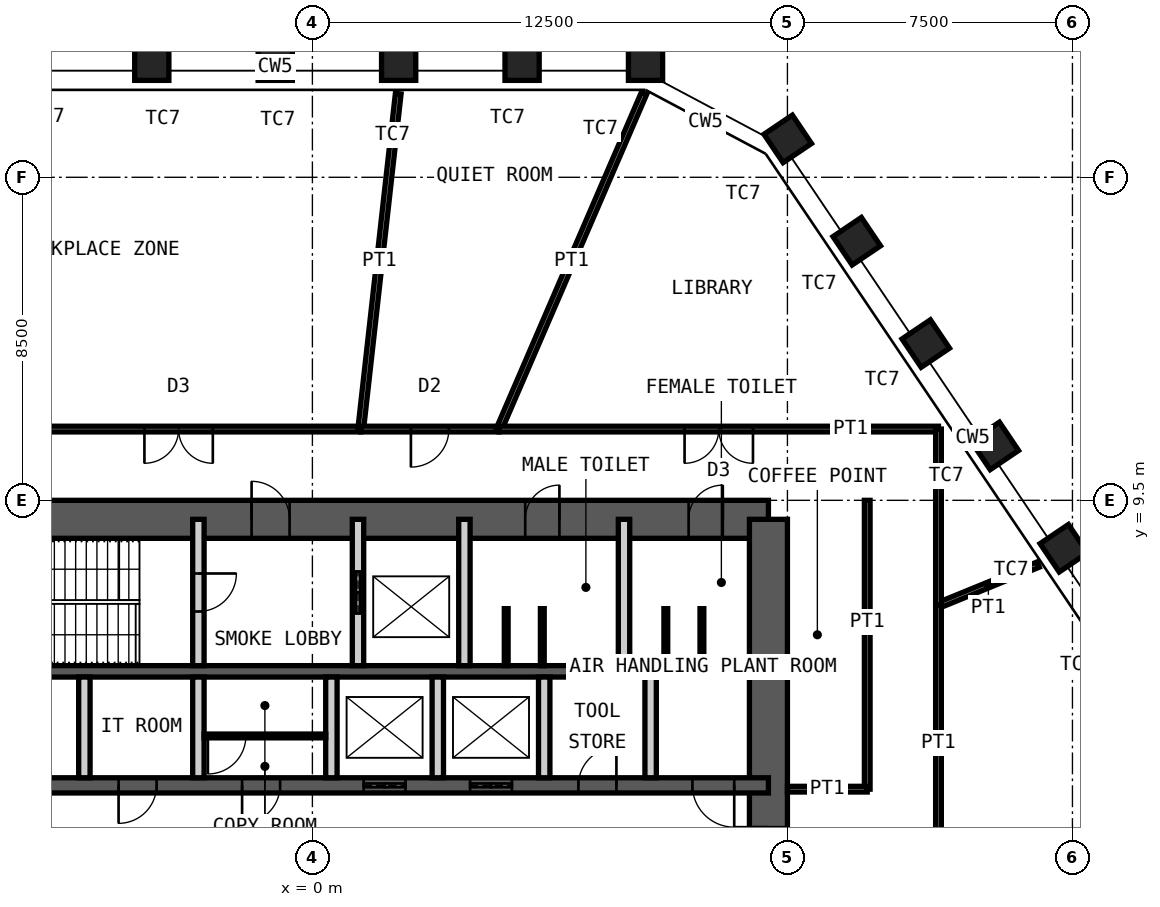
"""IFC4 building model, lengths in metres.
Left out: names, types, materials, properties, quantities, classifications, styles, units other than length and angle.
Written with IfcOpenShell. Run it as: python <this file> out.ifc"""

import sys

from ifc_helpers import new_model, si_unit, direction, frame, frame_2d, origin, origin_2d, place, context, subcontext, project, spatial, rectangle, hollow_rectangle, extrude, element, fill, save


model = new_model("IFC4")
c1 = context("Model", 3, precision=1e-05, world=origin(), true_north=direction((0.0, 1.0)))
c2 = subcontext(c1, "Body", "Model", "MODEL_VIEW")
j1 = project(units=[si_unit("LENGTHUNIT", "METRE"), si_unit("PLANEANGLEUNIT", "RADIAN")], contexts=[c1])
p1 = place(None, origin())
s1 = spatial("IfcSite", under=j1, at=p1, CompositionType="ELEMENT")
p2 = place(p1, origin())
s2 = spatial("IfcBuilding", under=s1, at=p2, CompositionType="ELEMENT")
p3 = place(p2, frame((0.0, 0.0, 287.2)))
s3 = spatial("IfcBuildingStorey", under=s2, at=p3, CompositionType="ELEMENT", Elevation=287.2)
for number, where, z_axis, x_axis in (
    (1, (-4.226, 21.0, 0.0), (0.0, 0.0, 1.0), (-1.0, 0.0, 0.0)),
    (2, (-0.978, 21.0, 0.0), (0.0, 0.0, 1.0), (-1.0, 0.0, 0.0)),
    (3, (2.27, 21.0, 0.0), (0.0, 0.0, 1.0), (-1.0, 0.0, 0.0)),
    (4, (5.518, 21.0, 0.0), (0.0, 0.0, 1.0), (-1.0, 0.0, 0.0)),
    (5, (8.766, 21.0, 0.0), (0.0, 0.0, 1.0), (-1.0, 0.0, 0.0)),
    (6, (12.508, 19.01, 0.0), (0.0, 0.0, 1.0), (-0.559, 0.829, 0.0)),
    (7, (14.324, 16.318, 0.0), (0.0, 0.0, 1.0), (-0.559, 0.829, 0.0)),
    (8, (16.141, 13.625, 0.0), (0.0, 0.0, 1.0), (-0.559, 0.829, 0.0)),
    (9, (17.957, 10.932, 0.0), (0.0, 0.0, 1.0), (-0.559, 0.829, 0.0)),
    (10, (19.773, 8.239, 0.0), (0.0, 0.0, 1.0), (-0.559, 0.829, 0.0)),
):
    element("IfcColumn", number, at=place(p3, frame(where, z_axis=z_axis, x_axis=x_axis)), inside=s3, PredefinedType="COLUMN", context=c2, shape_type="SweptSolid", body=[
        extrude(hollow_rectangle(XDim=0.9, YDim=0.9, WallThickness=0.06, at=origin_2d()), origin(), (0.0, 0.0, 1.0), 4.2),
    ])
p4 = place(p3, frame((-12.0, 9.0, 0.0), z_axis=(0.0, 0.0, 1.0), x_axis=(1.0, 0.0, 0.0)))
e11 = element("IfcWall", 11, at=p4, inside=s3, PredefinedType="SHEAR", context=c2, shape_type="SweptSolid", body=[
    extrude(rectangle(XDim=24.0, YDim=1.0, at=frame_2d((12.0, 0.0))), origin(), (0.0, 0.0, 1.0), 4.2),
])
p5 = place(p4, frame((10.4, 0.0, 0.0)))
e12 = element("IfcOpeningElement", 12, at=p5, cuts=e11, PredefinedType="OPENING", context=c2, shape_type="SweptSolid", body=[
    extrude(rectangle(XDim=1.0, YDim=2.1, at=frame_2d((0.5, 1.05))), frame((0.0, 0.51, 0.0), z_axis=(0.0, -1.0, 0.0), x_axis=(1.0, 0.0, 0.0)), (0.0, 0.0, 1.0), 1.02),
])
p6 = place(p4, frame((17.6, 0.0, 0.0)))
e13 = element("IfcOpeningElement", 13, at=p6, cuts=e11, PredefinedType="OPENING", context=c2, shape_type="SweptSolid", body=[
    extrude(rectangle(XDim=0.9, YDim=2.1, at=frame_2d((0.45, 1.05))), frame((0.0, 0.51, 0.0), z_axis=(0.0, -1.0, 0.0), x_axis=(1.0, 0.0, 0.0)), (0.0, 0.0, 1.0), 1.02),
])
p7 = place(p4, frame((21.9, 0.0, 0.0)))
e14 = element("IfcOpeningElement", 14, at=p7, cuts=e11, PredefinedType="OPENING", context=c2, shape_type="SweptSolid", body=[
    extrude(rectangle(XDim=0.9, YDim=2.1, at=frame_2d((0.45, 1.05))), frame((0.0, 0.51, 0.0), z_axis=(0.0, -1.0, 0.0), x_axis=(1.0, 0.0, 0.0)), (0.0, 0.0, 1.0), 1.02),
])
p8 = place(p3, frame((12.0, -9.0, 0.0), z_axis=(0.0, 0.0, 1.0), x_axis=(0.0, 1.0, 0.0)))
e15 = element("IfcWall", 15, at=p8, inside=s3, PredefinedType="SHEAR", context=c2, shape_type="SweptSolid", body=[
    extrude(rectangle(XDim=18.0, YDim=1.0, at=frame_2d((9.0, 0.0))), origin(), (0.0, 0.0, 1.0), 4.2),
])
p9 = place(p8, frame((8.1, 0.0, 0.0)))
e16 = element("IfcOpeningElement", 16, at=p9, cuts=e15, PredefinedType="OPENING", context=c2, shape_type="SweptSolid", body=[
    extrude(rectangle(XDim=1.8, YDim=2.1, at=frame_2d((0.9, 1.05))), frame((0.0, 0.51, 0.0), z_axis=(0.0, -1.0, 0.0), x_axis=(1.0, 0.0, 0.0)), (0.0, 0.0, 1.0), 1.02),
])
p10 = place(p3, frame((-12.0, 5.0, 0.0), z_axis=(0.0, 0.0, 1.0), x_axis=(1.0, 0.0, 0.0)))
e17 = element("IfcWall", 17, at=p10, inside=s3, PredefinedType="SHEAR", context=c2, shape_type="SweptSolid", body=[
    extrude(rectangle(XDim=24.0, YDim=0.3, at=frame_2d((12.0, 0.0))), origin(), (0.0, 0.0, 1.0), 4.2),
])
p11 = place(p3, frame((-12.0, 2.0, 0.0), z_axis=(0.0, 0.0, 1.0), x_axis=(1.0, 0.0, 0.0)))
e18 = element("IfcWall", 18, at=p11, inside=s3, PredefinedType="SHEAR", context=c2, shape_type="SweptSolid", body=[
    extrude(rectangle(XDim=24.0, YDim=0.4, at=frame_2d((12.0, 0.0))), origin(), (0.0, 0.0, 1.0), 4.2),
])
p12 = place(p11, frame((2.4, 0.0, 0.0)))
e19 = element("IfcOpeningElement", 19, at=p12, cuts=e18, PredefinedType="OPENING", context=c2, shape_type="SweptSolid", body=[
    extrude(rectangle(XDim=1.1, YDim=2.1, at=frame_2d((0.55, 1.05))), frame((0.0, 0.21, 0.0), z_axis=(0.0, -1.0, 0.0), x_axis=(1.0, 0.0, 0.0)), (0.0, 0.0, 1.0), 0.42),
])
p13 = place(p11, frame((22.0, 0.0, 0.0)))
e20 = element("IfcOpeningElement", 20, at=p13, cuts=e18, PredefinedType="OPENING", context=c2, shape_type="SweptSolid", body=[
    extrude(rectangle(XDim=1.1, YDim=2.1, at=frame_2d((0.55, 1.05))), frame((0.0, 0.21, 0.0), z_axis=(0.0, -1.0, 0.0), x_axis=(1.0, 0.0, 0.0)), (0.0, 0.0, 1.0), 0.42),
])
p14 = place(p11, frame((10.15, 0.0, 0.0)))
e21 = element("IfcOpeningElement", 21, at=p14, cuts=e18, PredefinedType="OPENING", context=c2, shape_type="SweptSolid", body=[
    extrude(rectangle(XDim=1.0, YDim=2.1, at=frame_2d((0.5, 1.05))), frame((0.0, 0.21, 0.0), z_axis=(0.0, -1.0, 0.0), x_axis=(1.0, 0.0, 0.0)), (0.0, 0.0, 1.0), 0.42),
])
p15 = place(p11, frame((6.9, 0.0, 0.0)))
e22 = element("IfcOpeningElement", 22, at=p15, cuts=e18, PredefinedType="OPENING", context=c2, shape_type="SweptSolid", body=[
    extrude(rectangle(XDim=1.0, YDim=2.1, at=frame_2d((0.5, 1.05))), frame((0.0, 0.21, 0.0), z_axis=(0.0, -1.0, 0.0), x_axis=(1.0, 0.0, 0.0)), (0.0, 0.0, 1.0), 0.42),
])
p16 = place(p11, frame((13.35, 0.0, 0.0)))
e23 = element("IfcOpeningElement", 23, at=p16, cuts=e18, PredefinedType="OPENING", context=c2, shape_type="SweptSolid", body=[
    extrude(rectangle(XDim=1.1, YDim=2.4, at=frame_2d((0.55, 1.2))), frame((0.0, 0.21, 0.0), z_axis=(0.0, -1.0, 0.0), x_axis=(1.0, 0.0, 0.0)), (0.0, 0.0, 1.0), 0.42),
])
p17 = place(p11, frame((16.15, 0.0, 0.0)))
e24 = element("IfcOpeningElement", 24, at=p17, cuts=e18, PredefinedType="OPENING", context=c2, shape_type="SweptSolid", body=[
    extrude(rectangle(XDim=1.1, YDim=2.4, at=frame_2d((0.55, 1.2))), frame((0.0, 0.21, 0.0), z_axis=(0.0, -1.0, 0.0), x_axis=(1.0, 0.0, 0.0)), (0.0, 0.0, 1.0), 0.42),
])
p18 = place(p11, frame((19.0, 0.0, 0.0)))
e25 = element("IfcOpeningElement", 25, at=p18, cuts=e18, PredefinedType="OPENING", context=c2, shape_type="SweptSolid", body=[
    extrude(rectangle(XDim=1.0, YDim=2.1, at=frame_2d((0.5, 1.05))), frame((0.0, 0.21, 0.0), z_axis=(0.0, -1.0, 0.0), x_axis=(1.0, 0.0, 0.0)), (0.0, 0.0, 1.0), 0.42),
])
p19 = place(p3, frame((-3.0, 5.15, 0.0), z_axis=(0.0, 0.0, 1.0), x_axis=(0.0, 1.0, 0.0)))
e26 = element("IfcWall", 26, at=p19, inside=s3, PredefinedType="PARTITIONING", context=c2, shape_type="SweptSolid", body=[
    extrude(rectangle(XDim=3.85, YDim=0.3, at=frame_2d((1.925, 0.0))), origin(), (0.0, 0.0, 1.0), 3.98),
])
p20 = place(p19, frame((1.425, 0.0, 0.0)))
e27 = element("IfcOpeningElement", 27, at=p20, cuts=e26, PredefinedType="OPENING", context=c2, shape_type="SweptSolid", body=[
    extrude(rectangle(XDim=1.0, YDim=2.1, at=frame_2d((0.5, 1.05))), frame((0.0, 0.16, 0.0), z_axis=(0.0, -1.0, 0.0), x_axis=(1.0, 0.0, 0.0)), (0.0, 0.0, 1.0), 0.32),
])
p21 = place(p3, frame((1.2, 5.15, 0.0), z_axis=(0.0, 0.0, 1.0), x_axis=(0.0, 1.0, 0.0)))
e28 = element("IfcWall", 28, at=p21, inside=s3, PredefinedType="PARTITIONING", context=c2, shape_type="SweptSolid", body=[
    extrude(rectangle(XDim=3.85, YDim=0.3, at=frame_2d((1.925, 0.0))), origin(), (0.0, 0.0, 1.0), 3.98),
])
p22 = place(p21, frame((1.375, 0.0, 0.0)))
e29 = element("IfcOpeningElement", 29, at=p22, cuts=e28, PredefinedType="OPENING", context=c2, shape_type="SweptSolid", body=[
    extrude(rectangle(XDim=1.1, YDim=2.4, at=frame_2d((0.55, 1.2))), frame((0.0, 0.16, 0.0), z_axis=(0.0, -1.0, 0.0), x_axis=(1.0, 0.0, 0.0)), (0.0, 0.0, 1.0), 0.32),
])
for number, where, z_axis, x_axis in (
    (30, (4.0, 5.15, 0.0), (0.0, 0.0, 1.0), (0.0, 1.0, 0.0)),
    (31, (8.2, 5.15, 0.0), (0.0, 0.0, 1.0), (0.0, 1.0, 0.0)),
):
    element("IfcWall", number, at=place(p3, frame(where, z_axis=z_axis, x_axis=x_axis)), inside=s3, PredefinedType="PARTITIONING", context=c2, shape_type="SweptSolid", body=[
        extrude(rectangle(XDim=3.85, YDim=0.3, at=frame_2d((1.925, 0.0))), origin(), (0.0, 0.0, 1.0), 3.98),
    ])
for number, where, z_axis, x_axis in (
    (32, (-6.0, 2.2, 0.0), (0.0, 0.0, 1.0), (0.0, 1.0, 0.0)),
    (33, (-3.0, 2.2, 0.0), (0.0, 0.0, 1.0), (0.0, 1.0, 0.0)),
    (34, (0.5, 2.2, 0.0), (0.0, 0.0, 1.0), (0.0, 1.0, 0.0)),
    (35, (3.3, 2.2, 0.0), (0.0, 0.0, 1.0), (0.0, 1.0, 0.0)),
    (36, (6.1, 2.2, 0.0), (0.0, 0.0, 1.0), (0.0, 1.0, 0.0)),
    (37, (8.9, 2.2, 0.0), (0.0, 0.0, 1.0), (0.0, 1.0, 0.0)),
):
    element("IfcWall", number, at=place(p3, frame(where, z_axis=z_axis, x_axis=x_axis)), inside=s3, PredefinedType="PARTITIONING", context=c2, shape_type="SweptSolid", body=[
        extrude(rectangle(XDim=2.65, YDim=0.3, at=frame_2d((1.325, 0.0))), origin(), (0.0, 0.0, 1.0), 3.98),
    ])
p23 = place(p3, frame((-2.85, 3.3, 0.0), z_axis=(0.0, 0.0, 1.0), x_axis=(1.0, 0.0, 0.0)))
e38 = element("IfcWall", 38, at=p23, inside=s3, PredefinedType="PARTITIONING", context=c2, shape_type="SweptSolid", body=[
    extrude(rectangle(XDim=3.2, YDim=0.1, at=frame_2d((1.6, 0.0))), origin(), (0.0, 0.0, 1.0), 3.98),
])
p24 = place(p23, frame((0.1, 0.0, 0.0)))
e39 = element("IfcOpeningElement", 39, at=p24, cuts=e38, PredefinedType="OPENING", context=c2, shape_type="SweptSolid", body=[
    extrude(rectangle(XDim=1.0, YDim=2.4, at=frame_2d((0.5, 1.2))), frame((0.0, 0.06, 0.0), z_axis=(0.0, -1.0, 0.0), x_axis=(1.0, 0.0, 0.0)), (0.0, 0.0, 1.0), 0.12),
])
for number, where, z_axis, x_axis in (
    (40, (5.1, 5.15, 0.0), (0.0, 0.0, 1.0), (0.0, 1.0, 0.0)),
    (41, (6.05, 5.15, 0.0), (0.0, 0.0, 1.0), (0.0, 1.0, 0.0)),
    (42, (9.3, 5.15, 0.0), (0.0, 0.0, 1.0), (0.0, 1.0, 0.0)),
    (43, (10.25, 5.15, 0.0), (0.0, 0.0, 1.0), (0.0, 1.0, 0.0)),
):
    element("IfcWall", number, at=place(p3, frame(where, z_axis=z_axis, x_axis=x_axis)), inside=s3, PredefinedType="PARTITIONING", context=c2, shape_type="SweptSolid", body=[
        extrude(rectangle(XDim=1.5, YDim=0.1, at=frame_2d((0.75, 0.0))), origin(), (0.0, 0.0, 1.0), 2.1),
    ])
p25 = place(p3, frame((19.1, 7.81, 0.0), z_axis=(0.0, 0.0, 1.0), x_axis=(-0.925593572601, -0.378518874509, 0.0)))
e44 = element("IfcWall", 44, at=p25, inside=s3, PredefinedType="PARTITIONING", context=c2, shape_type="SweptSolid", body=[
    extrude(rectangle(XDim=2.836, YDim=0.15, at=frame_2d((1.418, 0.0))), origin(), (0.0, 0.0, 1.0), 3.33),
])
p26 = place(p3, frame((16.475, 6.737, 0.0), z_axis=(0.0, 0.0, 1.0), x_axis=(0.0, -1.0, 0.0)))
e45 = element("IfcWall", 45, at=p26, inside=s3, PredefinedType="PARTITIONING", context=c2, shape_type="SweptSolid", body=[
    extrude(rectangle(XDim=18.112, YDim=0.15, at=frame_2d((9.056, 0.0))), origin(), (0.0, 0.0, 1.0), 4.03),
])
p27 = place(p26, frame((8.156, 0.0, 0.0)))
e46 = element("IfcOpeningElement", 46, at=p27, cuts=e45, PredefinedType="OPENING", context=c2, shape_type="SweptSolid", body=[
    extrude(rectangle(XDim=1.8, YDim=2.4, at=frame_2d((0.9, 1.2))), frame((0.0, 0.085, 0.0), z_axis=(0.0, -1.0, 0.0), x_axis=(1.0, 0.0, 0.0)), (0.0, 0.0, 1.0), 0.17),
])
p28 = place(p3, frame((-8.312, 11.375, 0.0), z_axis=(0.0, 0.0, 1.0), x_axis=(1.0, 0.0, 0.0)))
e47 = element("IfcWall", 47, at=p28, inside=s3, PredefinedType="PARTITIONING", context=c2, shape_type="SweptSolid", body=[
    extrude(rectangle(XDim=9.584, YDim=0.15, at=frame_2d((4.792, 0.0))), origin(), (0.0, 0.0, 1.0), 4.03),
])
p29 = place(p28, frame((3.892, 0.0, 0.0)))
e48 = element("IfcOpeningElement", 48, at=p29, cuts=e47, PredefinedType="OPENING", context=c2, shape_type="SweptSolid", body=[
    extrude(rectangle(XDim=1.8, YDim=2.4, at=frame_2d((0.9, 1.2))), frame((0.0, 0.085, 0.0), z_axis=(0.0, -1.0, 0.0), x_axis=(1.0, 0.0, 0.0)), (0.0, 0.0, 1.0), 0.17),
])
p30 = place(p3, frame((2.259, 20.201, 0.0), z_axis=(0.0, 0.0, 1.0), x_axis=(-0.11111945026, -0.993807057619, 0.0)))
e49 = element("IfcWall", 49, at=p30, inside=s3, PredefinedType="PARTITIONING", context=c2, shape_type="SweptSolid", body=[
    extrude(rectangle(XDim=8.881, YDim=0.15, at=frame_2d((4.44, 0.0))), origin(), (0.0, 0.0, 1.0), 3.33),
])
p31 = place(p3, frame((1.272, 11.375, 0.0), z_axis=(0.0, 0.0, 1.0), x_axis=(1.0, 0.0, 0.0)))
e50 = element("IfcWall", 50, at=p31, inside=s3, PredefinedType="PARTITIONING", context=c2, shape_type="SweptSolid", body=[
    extrude(rectangle(XDim=3.64, YDim=0.15, at=frame_2d((1.82, 0.0))), origin(), (0.0, 0.0, 1.0), 4.03),
])
p32 = place(p31, frame((1.32, 0.0, 0.0)))
e51 = element("IfcOpeningElement", 51, at=p32, cuts=e50, PredefinedType="OPENING", context=c2, shape_type="SweptSolid", body=[
    extrude(rectangle(XDim=1.0, YDim=2.4, at=frame_2d((0.5, 1.2))), frame((0.0, 0.085, 0.0), z_axis=(0.0, -1.0, 0.0), x_axis=(1.0, 0.0, 0.0)), (0.0, 0.0, 1.0), 0.17),
])
p33 = place(p3, frame((8.726, 20.208, 0.0), z_axis=(0.0, 0.0, 1.0), x_axis=(-0.396444279146, -0.918058785445, 0.0)))
e52 = element("IfcWall", 52, at=p33, inside=s3, PredefinedType="PARTITIONING", context=c2, shape_type="SweptSolid", body=[
    extrude(rectangle(XDim=9.622, YDim=0.15, at=frame_2d((4.811, 0.0))), origin(), (0.0, 0.0, 1.0), 2.93),
])
p34 = place(p3, frame((4.912, 11.375, 0.0), z_axis=(0.0, 0.0, 1.0), x_axis=(1.0, 0.0, 0.0)))
e53 = element("IfcWall", 53, at=p34, inside=s3, PredefinedType="PARTITIONING", context=c2, shape_type="SweptSolid", body=[
    extrude(rectangle(XDim=11.563, YDim=0.15, at=frame_2d((5.782, 0.0))), origin(), (0.0, 0.0, 1.0), 4.03),
])
p35 = place(p34, frame((4.882, 0.0, 0.0)))
e54 = element("IfcOpeningElement", 54, at=p35, cuts=e53, PredefinedType="OPENING", context=c2, shape_type="SweptSolid", body=[
    extrude(rectangle(XDim=1.8, YDim=2.4, at=frame_2d((0.9, 1.2))), frame((0.0, 0.085, 0.0), z_axis=(0.0, -1.0, 0.0), x_axis=(1.0, 0.0, 0.0)), (0.0, 0.0, 1.0), 0.17),
])
p36 = place(p3, frame((16.475, 11.375, 0.0), z_axis=(0.0, 0.0, 1.0), x_axis=(0.0, -1.0, 0.0)))
e55 = element("IfcWall", 55, at=p36, inside=s3, PredefinedType="PARTITIONING", context=c2, shape_type="SweptSolid", body=[
    extrude(rectangle(XDim=4.638, YDim=0.15, at=frame_2d((2.319, 0.0))), origin(), (0.0, 0.0, 1.0), 4.03),
])
p37 = place(p3, frame((14.6, 1.9, 0.0), z_axis=(0.0, 0.0, 1.0), x_axis=(0.0, 1.0, 0.0)))
e56 = element("IfcWall", 56, at=p37, inside=s3, PredefinedType="PARTITIONING", context=c2, shape_type="SweptSolid", body=[
    extrude(rectangle(XDim=7.6, YDim=0.15, at=frame_2d((3.8, 0.0))), origin(), (0.0, 0.0, 1.0), 4.03),
])
p38 = place(p3, frame((12.5, 1.9, 0.0), z_axis=(0.0, 0.0, 1.0), x_axis=(1.0, 0.0, 0.0)))
e57 = element("IfcWall", 57, at=p38, inside=s3, PredefinedType="PARTITIONING", context=c2, shape_type="SweptSolid", body=[
    extrude(rectangle(XDim=2.1, YDim=0.15, at=frame_2d((1.05, 0.0))), origin(), (0.0, 0.0, 1.0), 2.93),
])
p39 = place(p5, origin())
e58 = element("IfcDoor", 58, at=p39, inside=s3, OperationType="SINGLE_SWING_RIGHT", PredefinedType="DOOR", context=c2, shape_type="SweptSolid", body=[
    extrude(rectangle(XDim=1.0, YDim=2.1, at=frame_2d((0.5, 1.05))), frame((0.0, 0.025, 0.0), z_axis=(0.0, -1.0, 0.0), x_axis=(1.0, 0.0, 0.0)), (0.0, 0.0, 1.0), 0.05),
])
fill(e12, e58)
p40 = place(p6, origin())
e59 = element("IfcDoor", 59, at=p40, inside=s3, OperationType="SINGLE_SWING_LEFT", PredefinedType="DOOR", context=c2, shape_type="SweptSolid", body=[
    extrude(rectangle(XDim=0.9, YDim=2.1, at=frame_2d((0.45, 1.05))), frame((0.0, 0.025, 0.0), z_axis=(0.0, -1.0, 0.0), x_axis=(1.0, 0.0, 0.0)), (0.0, 0.0, 1.0), 0.05),
])
fill(e13, e59)
p41 = place(p7, origin())
e60 = element("IfcDoor", 60, at=p41, inside=s3, OperationType="SINGLE_SWING_LEFT", PredefinedType="DOOR", context=c2, shape_type="SweptSolid", body=[
    extrude(rectangle(XDim=0.9, YDim=2.1, at=frame_2d((0.45, 1.05))), frame((0.0, 0.025, 0.0), z_axis=(0.0, -1.0, 0.0), x_axis=(1.0, 0.0, 0.0)), (0.0, 0.0, 1.0), 0.05),
])
fill(e14, e60)
p42 = place(p20, origin())
e61 = element("IfcDoor", 61, at=p42, inside=s3, OperationType="SINGLE_SWING_RIGHT", PredefinedType="DOOR", context=c2, shape_type="SweptSolid", body=[
    extrude(rectangle(XDim=1.0, YDim=2.1, at=frame_2d((0.5, 1.05))), frame((0.0, 0.025, 0.0), z_axis=(0.0, -1.0, 0.0), x_axis=(1.0, 0.0, 0.0)), (0.0, 0.0, 1.0), 0.05),
])
fill(e27, e61)
p43 = place(p13, origin())
e62 = element("IfcDoor", 62, at=p43, inside=s3, OperationType="SINGLE_SWING_RIGHT", PredefinedType="DOOR", context=c2, shape_type="SweptSolid", body=[
    extrude(rectangle(XDim=1.1, YDim=2.1, at=frame_2d((0.55, 1.05))), frame((0.0, 0.025, 0.0), z_axis=(0.0, -1.0, 0.0), x_axis=(1.0, 0.0, 0.0)), (0.0, 0.0, 1.0), 0.05),
])
fill(e20, e62)
p44 = place(p14, origin())
e63 = element("IfcDoor", 63, at=p44, inside=s3, OperationType="SINGLE_SWING_LEFT", PredefinedType="DOOR", context=c2, shape_type="SweptSolid", body=[
    extrude(rectangle(XDim=1.0, YDim=2.1, at=frame_2d((0.5, 1.05))), frame((0.0, 0.025, 0.0), z_axis=(0.0, -1.0, 0.0), x_axis=(1.0, 0.0, 0.0)), (0.0, 0.0, 1.0), 0.05),
])
fill(e21, e63)
p45 = place(p9, origin())
e64 = element("IfcDoor", 64, at=p45, inside=s3, OperationType="DOUBLE_DOOR_DOUBLE_SWING", PredefinedType="DOOR", context=c2, shape_type="SweptSolid", body=[
    extrude(rectangle(XDim=1.8, YDim=2.1, at=frame_2d((0.9, 1.05))), frame((0.0, 0.025, 0.0), z_axis=(0.0, -1.0, 0.0), x_axis=(1.0, 0.0, 0.0)), (0.0, 0.0, 1.0), 0.05),
])
fill(e16, e64)
p46 = place(p22, origin())
e65 = element("IfcDoor", 65, at=p46, inside=s3, OperationType="DOUBLE_DOOR_SLIDING", PredefinedType="DOOR", context=c2, shape_type="SweptSolid", body=[
    extrude(rectangle(XDim=1.1, YDim=2.4, at=frame_2d((0.55, 1.2))), frame((0.0, 0.025, 0.0), z_axis=(0.0, -1.0, 0.0), x_axis=(1.0, 0.0, 0.0)), (0.0, 0.0, 1.0), 0.05),
])
fill(e29, e65)
p47 = place(p15, origin())
e66 = element("IfcDoor", 66, at=p47, inside=s3, OperationType="SINGLE_SWING_LEFT", PredefinedType="DOOR", context=c2, shape_type="SweptSolid", body=[
    extrude(rectangle(XDim=1.0, YDim=2.1, at=frame_2d((0.5, 1.05))), frame((0.0, 0.025, 0.0), z_axis=(0.0, -1.0, 0.0), x_axis=(1.0, 0.0, 0.0)), (0.0, 0.0, 1.0), 0.05),
])
fill(e22, e66)
p48 = place(p16, origin())
e67 = element("IfcDoor", 67, at=p48, inside=s3, OperationType="DOUBLE_DOOR_SLIDING", PredefinedType="DOOR", context=c2, shape_type="SweptSolid", body=[
    extrude(rectangle(XDim=1.1, YDim=2.4, at=frame_2d((0.55, 1.2))), frame((0.0, 0.025, 0.0), z_axis=(0.0, -1.0, 0.0), x_axis=(1.0, 0.0, 0.0)), (0.0, 0.0, 1.0), 0.05),
])
fill(e23, e67)
p49 = place(p17, origin())
e68 = element("IfcDoor", 68, at=p49, inside=s3, OperationType="DOUBLE_DOOR_SLIDING", PredefinedType="DOOR", context=c2, shape_type="SweptSolid", body=[
    extrude(rectangle(XDim=1.1, YDim=2.4, at=frame_2d((0.55, 1.2))), frame((0.0, 0.025, 0.0), z_axis=(0.0, -1.0, 0.0), x_axis=(1.0, 0.0, 0.0)), (0.0, 0.0, 1.0), 0.05),
])
fill(e24, e68)
p50 = place(p18, origin())
e69 = element("IfcDoor", 69, at=p50, inside=s3, OperationType="SINGLE_SWING_LEFT", PredefinedType="DOOR", context=c2, shape_type="SweptSolid", body=[
    extrude(rectangle(XDim=1.0, YDim=2.1, at=frame_2d((0.5, 1.05))), frame((0.0, 0.025, 0.0), z_axis=(0.0, -1.0, 0.0), x_axis=(1.0, 0.0, 0.0)), (0.0, 0.0, 1.0), 0.05),
])
fill(e25, e69)
p51 = place(p24, origin())
e70 = element("IfcDoor", 70, at=p51, inside=s3, OperationType="SINGLE_SWING_LEFT", PredefinedType="DOOR", context=c2, shape_type="SweptSolid", body=[
    extrude(rectangle(XDim=1.0, YDim=2.4, at=frame_2d((0.5, 1.2))), frame((0.0, 0.025, 0.0), z_axis=(0.0, -1.0, 0.0), x_axis=(1.0, 0.0, 0.0)), (0.0, 0.0, 1.0), 0.05),
])
fill(e39, e70)
p52 = place(p29, origin())
e71 = element("IfcDoor", 71, at=p52, inside=s3, OperationType="DOUBLE_DOOR_DOUBLE_SWING", PredefinedType="DOOR", context=c2, shape_type="SweptSolid", body=[
    extrude(rectangle(XDim=1.8, YDim=2.4, at=frame_2d((0.9, 1.2))), frame((0.0, 0.025, 0.0), z_axis=(0.0, -1.0, 0.0), x_axis=(1.0, 0.0, 0.0)), (0.0, 0.0, 1.0), 0.05),
])
fill(e48, e71)
p53 = place(p32, origin())
e72 = element("IfcDoor", 72, at=p53, inside=s3, OperationType="SINGLE_SWING_LEFT", PredefinedType="DOOR", context=c2, shape_type="SweptSolid", body=[
    extrude(rectangle(XDim=1.0, YDim=2.4, at=frame_2d((0.5, 1.2))), frame((0.0, 0.025, 0.0), z_axis=(0.0, -1.0, 0.0), x_axis=(1.0, 0.0, 0.0)), (0.0, 0.0, 1.0), 0.05),
])
fill(e51, e72)
p54 = place(p35, origin())
e73 = element("IfcDoor", 73, at=p54, inside=s3, OperationType="DOUBLE_DOOR_DOUBLE_SWING", PredefinedType="DOOR", context=c2, shape_type="SweptSolid", body=[
    extrude(rectangle(XDim=1.8, YDim=2.4, at=frame_2d((0.9, 1.2))), frame((0.0, 0.025, 0.0), z_axis=(0.0, -1.0, 0.0), x_axis=(1.0, 0.0, 0.0)), (0.0, 0.0, 1.0), 0.05),
])
fill(e54, e73)
save(model, sys.argv[1])
